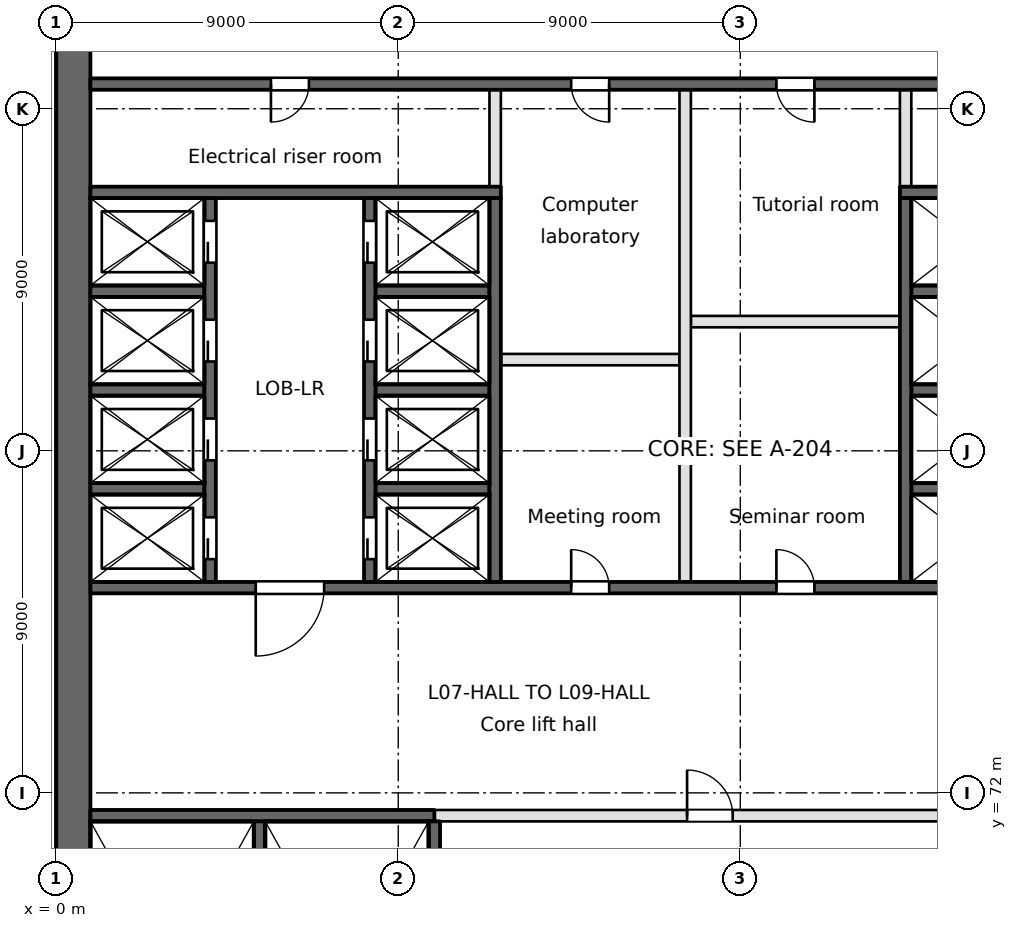
"""IFC4 building model, lengths in metres.
Left out: names, types, materials, properties, quantities, classifications, styles, units other than length and angle.
Written with IfcOpenShell. Run it as: python <this file> out.ifc"""

import sys

from ifc_helpers import new_model, si_unit, direction, frame, frame_2d, origin, place, context, subcontext, project, spatial, rectangle, extrude, element, fill, save


model = new_model("IFC4")
c1 = context("Model", 3, precision=1e-05, world=origin(), true_north=direction((0.0, 1.0)))
c2 = subcontext(c1, "Body", "Model", "MODEL_VIEW")
j1 = project(units=[si_unit("LENGTHUNIT", "METRE"), si_unit("PLANEANGLEUNIT", "RADIAN")], contexts=[c1])
p1 = place(None, origin())
s1 = spatial("IfcSite", under=j1, at=p1, CompositionType="ELEMENT")
p2 = place(p1, origin())
s2 = spatial("IfcBuilding", under=s1, at=p2, CompositionType="ELEMENT")
p3 = place(p2, frame((0.0, 0.0, 35.8)))
s3 = spatial("IfcBuildingStorey", under=s2, at=p3, CompositionType="ELEMENT", Elevation=35.8)
p4 = place(p3, frame((0.45, 94.5, 0.0), z_axis=(0.0, 0.0, 1.0), x_axis=(0.0, -1.0, 0.0)))
e1 = element("IfcWall", 1, at=p4, inside=s3, PredefinedType="SHEAR", context=c2, shape_type="SweptSolid", body=[
    extrude(rectangle(XDim=66.187, YDim=0.9, at=frame_2d((33.094, 0.0))), origin(), (0.0, 0.0, 1.0), 3.7),
])
p5 = place(p3, frame((0.9, 71.4, -0.4), z_axis=(0.0, 0.0, 1.0), x_axis=(1.0, 0.0, 0.0)))
e2 = element("IfcWall", 2, at=p5, inside=s3, PredefinedType="SOLIDWALL", context=c2, shape_type="SweptSolid", body=[
    extrude(rectangle(XDim=9.05, YDim=0.3, at=frame_2d((4.525, 0.0))), origin(), (0.0, 0.0, 1.0), 3.7),
])
p6 = place(p3, frame((9.95, 71.4, 0.0), z_axis=(0.0, 0.0, 1.0), x_axis=(1.0, 0.0, 0.0)))
e3 = element("IfcWall", 3, at=p6, inside=s3, PredefinedType="PARTITIONING", context=c2, shape_type="SweptSolid", body=[
    extrude(rectangle(XDim=17.65, YDim=0.3, at=frame_2d((8.825, 0.0))), origin(), (0.0, 0.0, 1.0), 3.3),
])
p7 = place(p6, frame((15.1, 0.0, 0.0)))
e4 = element("IfcOpeningElement", 4, at=p7, cuts=e3, PredefinedType="OPENING", context=c2, shape_type="SweptSolid", body=[
    extrude(rectangle(XDim=1.8, YDim=2.1, at=frame_2d((0.9, 1.05))), frame((0.0, 0.15, 0.0), z_axis=(0.0, -1.0, 0.0), x_axis=(1.0, 0.0, 0.0)), (0.0, 0.0, 1.0), 0.3),
])
p8 = place(p6, frame((6.65, 0.0, 0.0)))
e5 = element("IfcOpeningElement", 5, at=p8, cuts=e3, PredefinedType="OPENING", context=c2, shape_type="SweptSolid", body=[
    extrude(rectangle(XDim=1.2, YDim=2.1, at=frame_2d((0.6, 1.05))), frame((0.0, 0.15, 0.0), z_axis=(0.0, -1.0, 0.0), x_axis=(1.0, 0.0, 0.0)), (0.0, 0.0, 1.0), 0.3),
])
p9 = place(p3, frame((0.9, 77.4, -0.4), z_axis=(0.0, 0.0, 1.0), x_axis=(1.0, 0.0, 0.0)))
e6 = element("IfcWall", 6, at=p9, inside=s3, PredefinedType="SOLIDWALL", context=c2, shape_type="SweptSolid", body=[
    extrude(rectangle(XDim=28.95, YDim=0.3, at=frame_2d((14.475, 0.0))), origin(), (0.0, 0.0, 1.0), 3.7),
])
p10 = place(p9, frame((4.35, 0.0, 0.4)))
e7 = element("IfcOpeningElement", 7, at=p10, cuts=e6, PredefinedType="OPENING", context=c2, shape_type="SweptSolid", body=[
    extrude(rectangle(XDim=1.8, YDim=2.1, at=frame_2d((0.9, 1.05))), frame((0.0, 0.15, 0.0), z_axis=(0.0, -1.0, 0.0), x_axis=(1.0, 0.0, 0.0)), (0.0, 0.0, 1.0), 0.3),
])
p11 = place(p9, frame((25.95, 0.0, 0.4)))
e8 = element("IfcOpeningElement", 8, at=p11, cuts=e6, PredefinedType="OPENING", context=c2, shape_type="SweptSolid", body=[
    extrude(rectangle(XDim=1.8, YDim=2.1, at=frame_2d((0.9, 1.05))), frame((0.0, 0.15, 0.0), z_axis=(0.0, -1.0, 0.0), x_axis=(1.0, 0.0, 0.0)), (0.0, 0.0, 1.0), 0.3),
])
p12 = place(p9, frame((12.65, 0.0, 0.4)))
e9 = element("IfcOpeningElement", 9, at=p12, cuts=e6, PredefinedType="OPENING", context=c2, shape_type="SweptSolid", body=[
    extrude(rectangle(XDim=1.0, YDim=2.1, at=frame_2d((0.5, 1.05))), frame((0.0, 0.15, 0.0), z_axis=(0.0, -1.0, 0.0), x_axis=(1.0, 0.0, 0.0)), (0.0, 0.0, 1.0), 0.3),
])
p13 = place(p9, frame((18.05, 0.0, 0.4)))
e10 = element("IfcOpeningElement", 10, at=p13, cuts=e6, PredefinedType="OPENING", context=c2, shape_type="SweptSolid", body=[
    extrude(rectangle(XDim=1.0, YDim=2.1, at=frame_2d((0.5, 1.05))), frame((0.0, 0.15, 0.0), z_axis=(0.0, -1.0, 0.0), x_axis=(1.0, 0.0, 0.0)), (0.0, 0.0, 1.0), 0.3),
])
for number, where, z_axis, x_axis in (
    (11, (0.9, 80.0, -0.4), (0.0, 0.0, 1.0), (1.0, 0.0, 0.0)),
    (12, (8.4, 80.0, -0.4), (0.0, 0.0, 1.0), (1.0, 0.0, 0.0)),
    (13, (22.5, 80.0, -0.4), (0.0, 0.0, 1.0), (1.0, 0.0, 0.0)),
    (14, (0.9, 82.6, -0.4), (0.0, 0.0, 1.0), (1.0, 0.0, 0.0)),
    (15, (8.4, 82.6, -0.4), (0.0, 0.0, 1.0), (1.0, 0.0, 0.0)),
    (16, (22.5, 82.6, -0.4), (0.0, 0.0, 1.0), (1.0, 0.0, 0.0)),
):
    element("IfcWall", number, at=place(p3, frame(where, z_axis=z_axis, x_axis=x_axis)), inside=s3, PredefinedType="SOLIDWALL", context=c2, shape_type="SweptSolid", body=[
        extrude(rectangle(XDim=3.0, YDim=0.3, at=frame_2d((1.5, 0.0))), origin(), (0.0, 0.0, 1.0), 3.7),
    ])
p14 = place(p3, frame((11.7, 83.4, 0.0), z_axis=(0.0, 0.0, 1.0), x_axis=(1.0, 0.0, 0.0)))
e17 = element("IfcWall", 17, at=p14, inside=s3, PredefinedType="PARTITIONING", context=c2, shape_type="SweptSolid", body=[
    extrude(rectangle(XDim=4.7, YDim=0.3, at=frame_2d((2.35, 0.0))), origin(), (0.0, 0.0, 1.0), 3.3),
])
p15 = place(p3, frame((16.7, 84.4, 0.0), z_axis=(0.0, 0.0, 1.0), x_axis=(1.0, 0.0, 0.0)))
e18 = element("IfcWall", 18, at=p15, inside=s3, PredefinedType="PARTITIONING", context=c2, shape_type="SweptSolid", body=[
    extrude(rectangle(XDim=5.5, YDim=0.3, at=frame_2d((2.75, 0.0))), origin(), (0.0, 0.0, 1.0), 3.3),
])
for number, where, z_axis, x_axis in (
    (19, (0.9, 85.2, -0.4), (0.0, 0.0, 1.0), (1.0, 0.0, 0.0)),
    (20, (8.4, 85.2, -0.4), (0.0, 0.0, 1.0), (1.0, 0.0, 0.0)),
    (21, (22.5, 85.2, -0.4), (0.0, 0.0, 1.0), (1.0, 0.0, 0.0)),
):
    element("IfcWall", number, at=place(p3, frame(where, z_axis=z_axis, x_axis=x_axis)), inside=s3, PredefinedType="SOLIDWALL", context=c2, shape_type="SweptSolid", body=[
        extrude(rectangle(XDim=3.0, YDim=0.3, at=frame_2d((1.5, 0.0))), origin(), (0.0, 0.0, 1.0), 3.7),
    ])
p16 = place(p3, frame((0.9, 87.8, -0.4), z_axis=(0.0, 0.0, 1.0), x_axis=(1.0, 0.0, 0.0)))
e22 = element("IfcWall", 22, at=p16, inside=s3, PredefinedType="SOLIDWALL", context=c2, shape_type="SweptSolid", body=[
    extrude(rectangle(XDim=10.8, YDim=0.3, at=frame_2d((5.4, 0.0))), origin(), (0.0, 0.0, 1.0), 3.7),
])
p17 = place(p3, frame((22.2, 87.8, -0.4), z_axis=(0.0, 0.0, 1.0), x_axis=(1.0, 0.0, 0.0)))
e23 = element("IfcWall", 23, at=p17, inside=s3, PredefinedType="SOLIDWALL", context=c2, shape_type="SweptSolid", body=[
    extrude(rectangle(XDim=7.8, YDim=0.3, at=frame_2d((3.9, 0.0))), origin(), (0.0, 0.0, 1.0), 3.7),
])
p18 = place(p3, frame((0.9, 90.65, -0.4), z_axis=(0.0, 0.0, 1.0), x_axis=(1.0, 0.0, 0.0)))
e24 = element("IfcWall", 24, at=p18, inside=s3, PredefinedType="SOLIDWALL", context=c2, shape_type="SweptSolid", body=[
    extrude(rectangle(XDim=34.6, YDim=0.3, at=frame_2d((17.3, 0.0))), origin(), (0.0, 0.0, 1.0), 3.7),
])
p19 = place(p18, frame((4.75, 0.0, 0.4)))
e25 = element("IfcOpeningElement", 25, at=p19, cuts=e24, PredefinedType="OPENING", context=c2, shape_type="SweptSolid", body=[
    extrude(rectangle(XDim=1.0, YDim=2.1, at=frame_2d((0.5, 1.05))), frame((0.0, 0.15, 0.0), z_axis=(0.0, -1.0, 0.0), x_axis=(1.0, 0.0, 0.0)), (0.0, 0.0, 1.0), 0.3),
])
p20 = place(p18, frame((24.7, 0.0, 0.4)))
e26 = element("IfcOpeningElement", 26, at=p20, cuts=e24, PredefinedType="OPENING", context=c2, shape_type="SweptSolid", body=[
    extrude(rectangle(XDim=1.0, YDim=2.1, at=frame_2d((0.5, 1.05))), frame((0.0, 0.15, 0.0), z_axis=(0.0, -1.0, 0.0), x_axis=(1.0, 0.0, 0.0)), (0.0, 0.0, 1.0), 0.3),
])
p21 = place(p18, frame((12.65, 0.0, 0.4)))
e27 = element("IfcOpeningElement", 27, at=p21, cuts=e24, PredefinedType="OPENING", context=c2, shape_type="SweptSolid", body=[
    extrude(rectangle(XDim=1.0, YDim=2.1, at=frame_2d((0.5, 1.05))), frame((0.0, 0.15, 0.0), z_axis=(0.0, -1.0, 0.0), x_axis=(1.0, 0.0, 0.0)), (0.0, 0.0, 1.0), 0.3),
])
p22 = place(p18, frame((18.05, 0.0, 0.4)))
e28 = element("IfcOpeningElement", 28, at=p22, cuts=e24, PredefinedType="OPENING", context=c2, shape_type="SweptSolid", body=[
    extrude(rectangle(XDim=1.0, YDim=2.1, at=frame_2d((0.5, 1.05))), frame((0.0, 0.15, 0.0), z_axis=(0.0, -1.0, 0.0), x_axis=(1.0, 0.0, 0.0)), (0.0, 0.0, 1.0), 0.3),
])
p23 = place(p18, frame((31.4, 0.0, 0.4)))
e29 = element("IfcOpeningElement", 29, at=p23, cuts=e24, PredefinedType="OPENING", context=c2, shape_type="SweptSolid", body=[
    extrude(rectangle(XDim=1.0, YDim=2.1, at=frame_2d((0.5, 1.05))), frame((0.0, 0.15, 0.0), z_axis=(0.0, -1.0, 0.0), x_axis=(1.0, 0.0, 0.0)), (0.0, 0.0, 1.0), 0.3),
])
p24 = place(p3, frame((4.05, 77.55, -0.4), z_axis=(0.0, 0.0, 1.0), x_axis=(0.0, 1.0, 0.0)))
e30 = element("IfcWall", 30, at=p24, inside=s3, PredefinedType="SOLIDWALL", context=c2, shape_type="SweptSolid", body=[
    extrude(rectangle(XDim=10.1, YDim=0.3, at=frame_2d((5.05, 0.0))), origin(), (0.0, 0.0, 1.0), 3.7),
])
p25 = place(p24, frame((0.6, 0.0, 0.4)))
e31 = element("IfcOpeningElement", 31, at=p25, cuts=e30, PredefinedType="OPENING", context=c2, shape_type="SweptSolid", body=[
    extrude(rectangle(XDim=1.1, YDim=2.1, at=frame_2d((0.55, 1.05))), frame((0.0, 0.15, 0.0), z_axis=(0.0, -1.0, 0.0), x_axis=(1.0, 0.0, 0.0)), (0.0, 0.0, 1.0), 0.3),
])
p26 = place(p24, frame((3.2, 0.0, 0.4)))
e32 = element("IfcOpeningElement", 32, at=p26, cuts=e30, PredefinedType="OPENING", context=c2, shape_type="SweptSolid", body=[
    extrude(rectangle(XDim=1.1, YDim=2.1, at=frame_2d((0.55, 1.05))), frame((0.0, 0.15, 0.0), z_axis=(0.0, -1.0, 0.0), x_axis=(1.0, 0.0, 0.0)), (0.0, 0.0, 1.0), 0.3),
])
p27 = place(p24, frame((5.8, 0.0, 0.4)))
e33 = element("IfcOpeningElement", 33, at=p27, cuts=e30, PredefinedType="OPENING", context=c2, shape_type="SweptSolid", body=[
    extrude(rectangle(XDim=1.1, YDim=2.1, at=frame_2d((0.55, 1.05))), frame((0.0, 0.15, 0.0), z_axis=(0.0, -1.0, 0.0), x_axis=(1.0, 0.0, 0.0)), (0.0, 0.0, 1.0), 0.3),
])
p28 = place(p24, frame((8.4, 0.0, 0.4)))
e34 = element("IfcOpeningElement", 34, at=p28, cuts=e30, PredefinedType="OPENING", context=c2, shape_type="SweptSolid", body=[
    extrude(rectangle(XDim=1.1, YDim=2.1, at=frame_2d((0.55, 1.05))), frame((0.0, 0.15, 0.0), z_axis=(0.0, -1.0, 0.0), x_axis=(1.0, 0.0, 0.0)), (0.0, 0.0, 1.0), 0.3),
])
p29 = place(p3, frame((5.35, 63.5, -0.4), z_axis=(0.0, 0.0, 1.0), x_axis=(0.0, 1.0, 0.0)))
e35 = element("IfcWall", 35, at=p29, inside=s3, PredefinedType="SOLIDWALL", context=c2, shape_type="SweptSolid", body=[
    extrude(rectangle(XDim=7.75, YDim=0.3, at=frame_2d((3.875, 0.0))), origin(), (0.0, 0.0, 1.0), 3.7),
])
p30 = place(p3, frame((8.25, 77.55, -0.4), z_axis=(0.0, 0.0, 1.0), x_axis=(0.0, 1.0, 0.0)))
e36 = element("IfcWall", 36, at=p30, inside=s3, PredefinedType="SOLIDWALL", context=c2, shape_type="SweptSolid", body=[
    extrude(rectangle(XDim=10.1, YDim=0.3, at=frame_2d((5.05, 0.0))), origin(), (0.0, 0.0, 1.0), 3.7),
])
p31 = place(p30, frame((0.6, 0.0, 0.4)))
e37 = element("IfcOpeningElement", 37, at=p31, cuts=e36, PredefinedType="OPENING", context=c2, shape_type="SweptSolid", body=[
    extrude(rectangle(XDim=1.1, YDim=2.1, at=frame_2d((0.55, 1.05))), frame((0.0, 0.15, 0.0), z_axis=(0.0, -1.0, 0.0), x_axis=(1.0, 0.0, 0.0)), (0.0, 0.0, 1.0), 0.3),
])
p32 = place(p30, frame((3.2, 0.0, 0.4)))
e38 = element("IfcOpeningElement", 38, at=p32, cuts=e36, PredefinedType="OPENING", context=c2, shape_type="SweptSolid", body=[
    extrude(rectangle(XDim=1.1, YDim=2.1, at=frame_2d((0.55, 1.05))), frame((0.0, 0.15, 0.0), z_axis=(0.0, -1.0, 0.0), x_axis=(1.0, 0.0, 0.0)), (0.0, 0.0, 1.0), 0.3),
])
p33 = place(p30, frame((5.8, 0.0, 0.4)))
e39 = element("IfcOpeningElement", 39, at=p33, cuts=e36, PredefinedType="OPENING", context=c2, shape_type="SweptSolid", body=[
    extrude(rectangle(XDim=1.1, YDim=2.1, at=frame_2d((0.55, 1.05))), frame((0.0, 0.15, 0.0), z_axis=(0.0, -1.0, 0.0), x_axis=(1.0, 0.0, 0.0)), (0.0, 0.0, 1.0), 0.3),
])
p34 = place(p30, frame((8.4, 0.0, 0.4)))
e40 = element("IfcOpeningElement", 40, at=p34, cuts=e36, PredefinedType="OPENING", context=c2, shape_type="SweptSolid", body=[
    extrude(rectangle(XDim=1.1, YDim=2.1, at=frame_2d((0.55, 1.05))), frame((0.0, 0.15, 0.0), z_axis=(0.0, -1.0, 0.0), x_axis=(1.0, 0.0, 0.0)), (0.0, 0.0, 1.0), 0.3),
])
p35 = place(p3, frame((9.95, 63.5, -0.4), z_axis=(0.0, 0.0, 1.0), x_axis=(0.0, 1.0, 0.0)))
e41 = element("IfcWall", 41, at=p35, inside=s3, PredefinedType="SOLIDWALL", context=c2, shape_type="SweptSolid", body=[
    extrude(rectangle(XDim=7.75, YDim=0.3, at=frame_2d((3.875, 0.0))), origin(), (0.0, 0.0, 1.0), 3.7),
])
p36 = place(p3, frame((11.55, 77.55, -0.4), z_axis=(0.0, 0.0, 1.0), x_axis=(0.0, 1.0, 0.0)))
e42 = element("IfcWall", 42, at=p36, inside=s3, PredefinedType="SOLIDWALL", context=c2, shape_type="SweptSolid", body=[
    extrude(rectangle(XDim=10.1, YDim=0.3, at=frame_2d((5.05, 0.0))), origin(), (0.0, 0.0, 1.0), 3.7),
])
p37 = place(p3, frame((11.55, 87.95, 0.0), z_axis=(0.0, 0.0, 1.0), x_axis=(0.0, 1.0, 0.0)))
e43 = element("IfcWall", 43, at=p37, inside=s3, PredefinedType="PARTITIONING", context=c2, shape_type="SweptSolid", body=[
    extrude(rectangle(XDim=2.55, YDim=0.3, at=frame_2d((1.275, 0.0))), origin(), (0.0, 0.0, 1.0), 3.3),
])
p38 = place(p3, frame((16.55, 77.55, 0.0), z_axis=(0.0, 0.0, 1.0), x_axis=(0.0, 1.0, 0.0)))
e44 = element("IfcWall", 44, at=p38, inside=s3, PredefinedType="PARTITIONING", context=c2, shape_type="SweptSolid", body=[
    extrude(rectangle(XDim=12.95, YDim=0.3, at=frame_2d((6.475, 0.0))), origin(), (0.0, 0.0, 1.0), 3.3),
])
p39 = place(p3, frame((22.35, 77.55, -0.4), z_axis=(0.0, 0.0, 1.0), x_axis=(0.0, 1.0, 0.0)))
e45 = element("IfcWall", 45, at=p39, inside=s3, PredefinedType="SOLIDWALL", context=c2, shape_type="SweptSolid", body=[
    extrude(rectangle(XDim=10.1, YDim=0.3, at=frame_2d((5.05, 0.0))), origin(), (0.0, 0.0, 1.0), 3.7),
])
p40 = place(p3, frame((22.35, 87.95, 0.0), z_axis=(0.0, 0.0, 1.0), x_axis=(0.0, 1.0, 0.0)))
e46 = element("IfcWall", 46, at=p40, inside=s3, PredefinedType="PARTITIONING", context=c2, shape_type="SweptSolid", body=[
    extrude(rectangle(XDim=2.55, YDim=0.3, at=frame_2d((1.275, 0.0))), origin(), (0.0, 0.0, 1.0), 3.3),
])
p41 = place(p25, origin())
e47 = element("IfcDoor", 47, at=p41, inside=s3, OperationType="SLIDING_TO_RIGHT", PredefinedType="DOOR", context=c2, shape_type="SweptSolid", body=[
    extrude(rectangle(XDim=1.1, YDim=2.1, at=frame_2d((0.55, 1.05))), frame((0.0, 0.025, 0.0), z_axis=(0.0, -1.0, 0.0), x_axis=(1.0, 0.0, 0.0)), (0.0, 0.0, 1.0), 0.05),
])
fill(e31, e47)
p42 = place(p26, origin())
e48 = element("IfcDoor", 48, at=p42, inside=s3, OperationType="SLIDING_TO_LEFT", PredefinedType="DOOR", context=c2, shape_type="SweptSolid", body=[
    extrude(rectangle(XDim=1.1, YDim=2.1, at=frame_2d((0.55, 1.05))), frame((0.0, 0.025, 0.0), z_axis=(0.0, -1.0, 0.0), x_axis=(1.0, 0.0, 0.0)), (0.0, 0.0, 1.0), 0.05),
])
fill(e32, e48)
p43 = place(p27, origin())
e49 = element("IfcDoor", 49, at=p43, inside=s3, OperationType="SLIDING_TO_RIGHT", PredefinedType="DOOR", context=c2, shape_type="SweptSolid", body=[
    extrude(rectangle(XDim=1.1, YDim=2.1, at=frame_2d((0.55, 1.05))), frame((0.0, 0.025, 0.0), z_axis=(0.0, -1.0, 0.0), x_axis=(1.0, 0.0, 0.0)), (0.0, 0.0, 1.0), 0.05),
])
fill(e33, e49)
p44 = place(p28, origin())
e50 = element("IfcDoor", 50, at=p44, inside=s3, OperationType="SLIDING_TO_LEFT", PredefinedType="DOOR", context=c2, shape_type="SweptSolid", body=[
    extrude(rectangle(XDim=1.1, YDim=2.1, at=frame_2d((0.55, 1.05))), frame((0.0, 0.025, 0.0), z_axis=(0.0, -1.0, 0.0), x_axis=(1.0, 0.0, 0.0)), (0.0, 0.0, 1.0), 0.05),
])
fill(e34, e50)
p45 = place(p31, origin())
e51 = element("IfcDoor", 51, at=p45, inside=s3, OperationType="SLIDING_TO_RIGHT", PredefinedType="DOOR", context=c2, shape_type="SweptSolid", body=[
    extrude(rectangle(XDim=1.1, YDim=2.1, at=frame_2d((0.55, 1.05))), frame((0.0, 0.025, 0.0), z_axis=(0.0, -1.0, 0.0), x_axis=(1.0, 0.0, 0.0)), (0.0, 0.0, 1.0), 0.05),
])
fill(e37, e51)
p46 = place(p32, origin())
e52 = element("IfcDoor", 52, at=p46, inside=s3, OperationType="SLIDING_TO_LEFT", PredefinedType="DOOR", context=c2, shape_type="SweptSolid", body=[
    extrude(rectangle(XDim=1.1, YDim=2.1, at=frame_2d((0.55, 1.05))), frame((0.0, 0.025, 0.0), z_axis=(0.0, -1.0, 0.0), x_axis=(1.0, 0.0, 0.0)), (0.0, 0.0, 1.0), 0.05),
])
fill(e38, e52)
p47 = place(p33, origin())
e53 = element("IfcDoor", 53, at=p47, inside=s3, OperationType="SLIDING_TO_RIGHT", PredefinedType="DOOR", context=c2, shape_type="SweptSolid", body=[
    extrude(rectangle(XDim=1.1, YDim=2.1, at=frame_2d((0.55, 1.05))), frame((0.0, 0.025, 0.0), z_axis=(0.0, -1.0, 0.0), x_axis=(1.0, 0.0, 0.0)), (0.0, 0.0, 1.0), 0.05),
])
fill(e39, e53)
p48 = place(p34, origin())
e54 = element("IfcDoor", 54, at=p48, inside=s3, OperationType="SLIDING_TO_LEFT", PredefinedType="DOOR", context=c2, shape_type="SweptSolid", body=[
    extrude(rectangle(XDim=1.1, YDim=2.1, at=frame_2d((0.55, 1.05))), frame((0.0, 0.025, 0.0), z_axis=(0.0, -1.0, 0.0), x_axis=(1.0, 0.0, 0.0)), (0.0, 0.0, 1.0), 0.05),
])
fill(e40, e54)
p49 = place(p10, frame((1.8, 0.0, 0.0), z_axis=(0.0, 0.0, 1.0), x_axis=(-1.0, 0.0, 0.0)))
e55 = element("IfcDoor", 55, at=p49, inside=s3, OperationType="SINGLE_SWING_RIGHT", PredefinedType="DOOR", context=c2, shape_type="SweptSolid", body=[
    extrude(rectangle(XDim=1.8, YDim=2.1, at=frame_2d((0.9, 1.05))), frame((0.0, 0.025, 0.0), z_axis=(0.0, -1.0, 0.0), x_axis=(1.0, 0.0, 0.0)), (0.0, 0.0, 1.0), 0.05),
])
fill(e7, e55)
p50 = place(p8, origin())
e56 = element("IfcDoor", 56, at=p50, inside=s3, OperationType="SINGLE_SWING_LEFT", PredefinedType="DOOR", context=c2, shape_type="SweptSolid", body=[
    extrude(rectangle(XDim=1.2, YDim=2.1, at=frame_2d((0.6, 1.05))), frame((0.0, 0.025, 0.0), z_axis=(0.0, -1.0, 0.0), x_axis=(1.0, 0.0, 0.0)), (0.0, 0.0, 1.0), 0.05),
])
fill(e5, e56)
p51 = place(p19, frame((1.0, 0.0, 0.0), z_axis=(0.0, 0.0, 1.0), x_axis=(-1.0, 0.0, 0.0)))
e57 = element("IfcDoor", 57, at=p51, inside=s3, OperationType="SINGLE_SWING_RIGHT", PredefinedType="DOOR", context=c2, shape_type="SweptSolid", body=[
    extrude(rectangle(XDim=1.0, YDim=2.1, at=frame_2d((0.5, 1.05))), frame((0.0, 0.025, 0.0), z_axis=(0.0, -1.0, 0.0), x_axis=(1.0, 0.0, 0.0)), (0.0, 0.0, 1.0), 0.05),
])
fill(e25, e57)
p52 = place(p12, origin())
e58 = element("IfcDoor", 58, at=p52, inside=s3, OperationType="SINGLE_SWING_LEFT", PredefinedType="DOOR", context=c2, shape_type="SweptSolid", body=[
    extrude(rectangle(XDim=1.0, YDim=2.1, at=frame_2d((0.5, 1.05))), frame((0.0, 0.025, 0.0), z_axis=(0.0, -1.0, 0.0), x_axis=(1.0, 0.0, 0.0)), (0.0, 0.0, 1.0), 0.05),
])
fill(e9, e58)
p53 = place(p21, frame((1.0, 0.0, 0.0), z_axis=(0.0, 0.0, 1.0), x_axis=(-1.0, 0.0, 0.0)))
e59 = element("IfcDoor", 59, at=p53, inside=s3, OperationType="SINGLE_SWING_LEFT", PredefinedType="DOOR", context=c2, shape_type="SweptSolid", body=[
    extrude(rectangle(XDim=1.0, YDim=2.1, at=frame_2d((0.5, 1.05))), frame((0.0, 0.025, 0.0), z_axis=(0.0, -1.0, 0.0), x_axis=(1.0, 0.0, 0.0)), (0.0, 0.0, 1.0), 0.05),
])
fill(e27, e59)
p54 = place(p13, origin())
e60 = element("IfcDoor", 60, at=p54, inside=s3, OperationType="SINGLE_SWING_LEFT", PredefinedType="DOOR", context=c2, shape_type="SweptSolid", body=[
    extrude(rectangle(XDim=1.0, YDim=2.1, at=frame_2d((0.5, 1.05))), frame((0.0, 0.025, 0.0), z_axis=(0.0, -1.0, 0.0), x_axis=(1.0, 0.0, 0.0)), (0.0, 0.0, 1.0), 0.05),
])
fill(e10, e60)
p55 = place(p22, frame((1.0, 0.0, 0.0), z_axis=(0.0, 0.0, 1.0), x_axis=(-1.0, 0.0, 0.0)))
e61 = element("IfcDoor", 61, at=p55, inside=s3, OperationType="SINGLE_SWING_LEFT", PredefinedType="DOOR", context=c2, shape_type="SweptSolid", body=[
    extrude(rectangle(XDim=1.0, YDim=2.1, at=frame_2d((0.5, 1.05))), frame((0.0, 0.025, 0.0), z_axis=(0.0, -1.0, 0.0), x_axis=(1.0, 0.0, 0.0)), (0.0, 0.0, 1.0), 0.05),
])
fill(e28, e61)
save(model, sys.argv[1])
